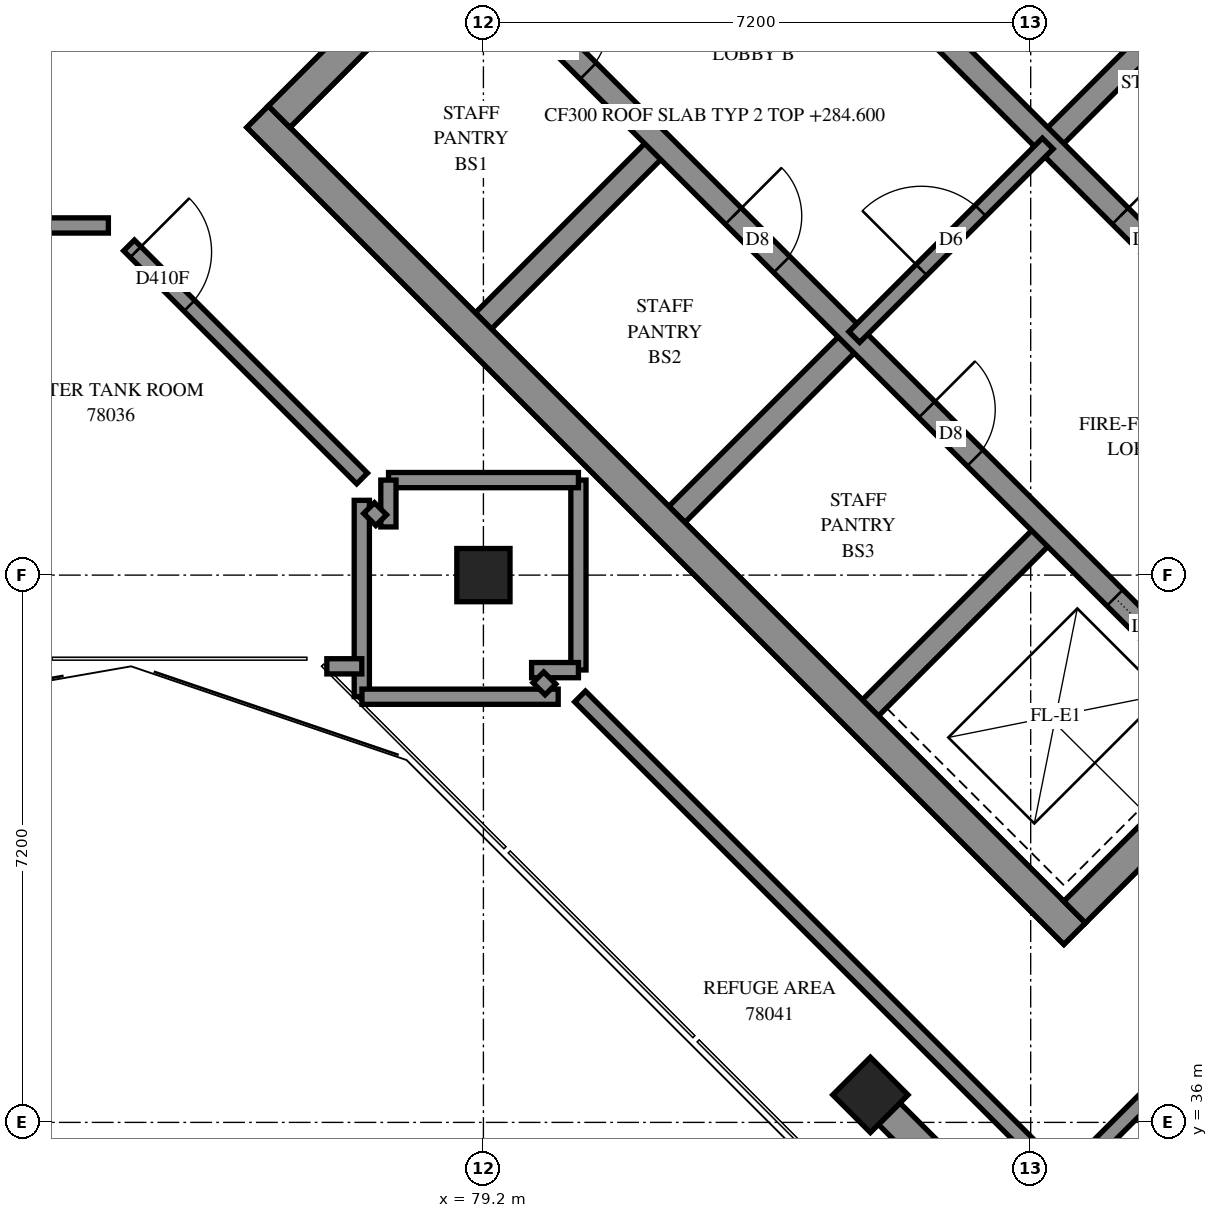
"""IFC4 building model, lengths in metres.
Left out: names, types, materials, properties, quantities, classifications, styles, units other than length and angle.
Written with IfcOpenShell. Run it as: python <this file> out.ifc"""

import sys

from ifc_helpers import new_model, si_unit, direction, frame, frame_2d, origin, origin_2d, place, context, subcontext, project, spatial, rectangle, extrude, element, fill, save


model = new_model("IFC4")
c1 = context("Model", 3, precision=1e-05, world=origin(), true_north=direction((0.0, 1.0)))
c2 = subcontext(c1, "Body", "Model", "MODEL_VIEW")
j1 = project(units=[si_unit("LENGTHUNIT", "METRE"), si_unit("PLANEANGLEUNIT", "RADIAN")], contexts=[c1])
p1 = place(None, origin())
s1 = spatial("IfcSite", under=j1, at=p1, CompositionType="ELEMENT")
p2 = place(p1, origin())
s2 = spatial("IfcBuilding", under=s1, at=p2, CompositionType="ELEMENT")
p3 = place(p2, frame((0.0, 0.0, 284.6)))
s3 = spatial("IfcBuildingStorey", under=s2, at=p3, CompositionType="ELEMENT", Elevation=284.6)
for number, where, z_axis, x_axis in (
    (1, (79.2, 43.2, 0.0), (0.0, 0.0, 1.0), (1.0, 0.0, 0.0)),
    (2, (84.291, 36.362, 0.0), (0.0, 0.0, 1.0), (0.707, -0.707, 0.0)),
):
    element("IfcColumn", number, at=place(p3, frame(where, z_axis=z_axis, x_axis=x_axis)), inside=s3, PredefinedType="COLUMN", context=c2, shape_type="SweptSolid", body=[
        extrude(rectangle(XDim=0.7, YDim=0.7, at=origin_2d()), origin(), (0.0, 0.0, 1.0), 5.7),
    ])
p4 = place(p3, frame((76.23, 49.231, -0.3), z_axis=(0.0, 0.0, 1.0), x_axis=(0.7071034917, -0.7071100706, 0.0)))
e3 = element("IfcWall", 3, at=p4, inside=s3, PredefinedType="SHEAR", context=c2, shape_type="SweptSolid", body=[
    extrude(rectangle(XDim=15.2, YDim=0.4, at=frame_2d((7.6, 0.0))), origin(), (0.0, 0.0, 1.0), 5.3),
])
p5 = place(p3, frame((86.695, 59.696, -0.3), z_axis=(0.0, 0.0, 1.0), x_axis=(0.7071100706, -0.7071034917, 0.0)))
e4 = element("IfcWall", 4, at=p5, inside=s3, PredefinedType="SHEAR", context=c2, shape_type="SweptSolid", body=[
    extrude(rectangle(XDim=15.2, YDim=0.4, at=frame_2d((7.6, 0.0))), origin(), (0.0, 0.0, 1.0), 5.3),
])
p6 = place(p5, frame((10.4, 0.0, 0.3)))
e5 = element("IfcOpeningElement", 5, at=p6, cuts=e4, PredefinedType="OPENING", context=c2, shape_type="SweptSolid", body=[
    extrude(rectangle(XDim=0.8, YDim=2.1, at=frame_2d((0.4, 1.05))), frame((0.0, 0.21, 0.0), z_axis=(0.0, -1.0, 0.0), x_axis=(1.0, 0.0, 0.0)), (0.0, 0.0, 1.0), 0.42),
])
p7 = place(p3, frame((76.513, 49.231, -0.3), z_axis=(0.0, 0.0, 1.0), x_axis=(0.7071067812, 0.7071067812, 0.0)))
e6 = element("IfcWall", 6, at=p7, inside=s3, PredefinedType="SHEAR", context=c2, shape_type="SweptSolid", body=[
    extrude(rectangle(XDim=14.4, YDim=0.4, at=frame_2d((7.2, 0.0))), origin(), (0.0, 0.0, 1.0), 5.3),
])
p8 = place(p7, frame((4.55, 0.0, 0.3)))
e7 = element("IfcOpeningElement", 7, at=p8, cuts=e6, PredefinedType="OPENING", context=c2, shape_type="SweptSolid", body=[
    extrude(rectangle(XDim=1.1, YDim=2.1, at=frame_2d((0.55, 1.05))), frame((0.0, 0.21, 0.0), z_axis=(0.0, -1.0, 0.0), x_axis=(1.0, 0.0, 0.0)), (0.0, 0.0, 1.0), 0.42),
])
p9 = place(p7, frame((11.35, 0.0, 0.3)))
e8 = element("IfcOpeningElement", 8, at=p9, cuts=e6, PredefinedType="OPENING", context=c2, shape_type="SweptSolid", body=[
    extrude(rectangle(XDim=1.1, YDim=2.1, at=frame_2d((0.55, 1.05))), frame((0.0, 0.21, 0.0), z_axis=(0.0, -1.0, 0.0), x_axis=(1.0, 0.0, 0.0)), (0.0, 0.0, 1.0), 0.42),
])
p10 = place(p3, frame((86.978, 38.766, -0.3), z_axis=(0.0, 0.0, 1.0), x_axis=(0.7071067812, 0.7071067812, 0.0)))
e9 = element("IfcWall", 9, at=p10, inside=s3, PredefinedType="SHEAR", context=c2, shape_type="SweptSolid", body=[
    extrude(rectangle(XDim=14.4, YDim=0.4, at=frame_2d((7.2, 0.0))), origin(), (0.0, 0.0, 1.0), 5.3),
])
p11 = place(p10, frame((4.55, 0.0, 0.3)))
e10 = element("IfcOpeningElement", 10, at=p11, cuts=e9, PredefinedType="OPENING", context=c2, shape_type="SweptSolid", body=[
    extrude(rectangle(XDim=1.1, YDim=2.1, at=frame_2d((0.55, 1.05))), frame((0.0, 0.21, 0.0), z_axis=(0.0, -1.0, 0.0), x_axis=(1.0, 0.0, 0.0)), (0.0, 0.0, 1.0), 0.42),
])
p12 = place(p10, frame((11.35, 0.0, 0.3)))
e11 = element("IfcOpeningElement", 11, at=p12, cuts=e9, PredefinedType="OPENING", context=c2, shape_type="SweptSolid", body=[
    extrude(rectangle(XDim=1.1, YDim=2.1, at=frame_2d((0.55, 1.05))), frame((0.0, 0.21, 0.0), z_axis=(0.0, -1.0, 0.0), x_axis=(1.0, 0.0, 0.0)), (0.0, 0.0, 1.0), 0.42),
])
p13 = place(p3, frame((79.2, 46.544, 0.0), z_axis=(0.0, 0.0, 1.0), x_axis=(0.7071219326, 0.7070916295, 0.0)))
e12 = element("IfcWall", 12, at=p13, inside=s3, PredefinedType="SOLIDWALL", context=c2, shape_type="SweptSolid", body=[
    extrude(rectangle(XDim=3.3, YDim=0.3, at=frame_2d((1.65, 0.0))), origin(), (0.0, 0.0, 1.0), 5.7),
])
p14 = place(p3, frame((81.746, 43.999, 0.0), z_axis=(0.0, 0.0, 1.0), x_axis=(0.7071067812, 0.7071067812, 0.0)))
e13 = element("IfcWall", 13, at=p14, inside=s3, PredefinedType="SOLIDWALL", context=c2, shape_type="SweptSolid", body=[
    extrude(rectangle(XDim=3.3, YDim=0.3, at=frame_2d((1.65, 0.0))), origin(), (0.0, 0.0, 1.0), 5.7),
])
p15 = place(p3, frame((86.625, 48.878, 0.0), z_axis=(0.0, 0.0, 1.0), x_axis=(0.7071067812, 0.7071067812, 0.0)))
e14 = element("IfcWall", 14, at=p15, inside=s3, PredefinedType="SOLIDWALL", context=c2, shape_type="SweptSolid", body=[
    extrude(rectangle(XDim=3.3, YDim=0.3, at=frame_2d((1.65, 0.0))), origin(), (0.0, 0.0, 1.0), 5.7),
])
p16 = place(p3, frame((84.291, 41.453, 0.0), z_axis=(0.0, 0.0, 1.0), x_axis=(0.7071067812, 0.7071067812, 0.0)))
e15 = element("IfcWall", 15, at=p16, inside=s3, PredefinedType="SOLIDWALL", context=c2, shape_type="SweptSolid", body=[
    extrude(rectangle(XDim=3.3, YDim=0.3, at=frame_2d((1.65, 0.0))), origin(), (0.0, 0.0, 1.0), 5.7),
])
p17 = place(p3, frame((78.988, 51.423, 0.0), z_axis=(0.0, 0.0, 1.0), x_axis=(0.7071067812, -0.7071067812, 0.0)))
e16 = element("IfcWall", 16, at=p17, inside=s3, PredefinedType="SOLIDWALL", context=c2, shape_type="SweptSolid", body=[
    extrude(rectangle(XDim=14.4, YDim=0.3, at=frame_2d((7.2, 0.0))), origin(), (0.0, 0.0, 1.0), 5.7),
])
p18 = place(p17, frame((1.35, 0.0, 0.0)))
e17 = element("IfcOpeningElement", 17, at=p18, cuts=e16, PredefinedType="OPENING", context=c2, shape_type="SweptSolid", body=[
    extrude(rectangle(XDim=0.9, YDim=2.1, at=frame_2d((0.45, 1.05))), frame((0.0, 0.16, 0.0), z_axis=(0.0, -1.0, 0.0), x_axis=(1.0, 0.0, 0.0)), (0.0, 0.0, 1.0), 0.32),
])
p19 = place(p17, frame((4.95, 0.0, 0.0)))
e18 = element("IfcOpeningElement", 18, at=p19, cuts=e16, PredefinedType="OPENING", context=c2, shape_type="SweptSolid", body=[
    extrude(rectangle(XDim=0.9, YDim=2.1, at=frame_2d((0.45, 1.05))), frame((0.0, 0.16, 0.0), z_axis=(0.0, -1.0, 0.0), x_axis=(1.0, 0.0, 0.0)), (0.0, 0.0, 1.0), 0.32),
])
p20 = place(p17, frame((8.55, 0.0, 0.0)))
e19 = element("IfcOpeningElement", 19, at=p20, cuts=e16, PredefinedType="OPENING", context=c2, shape_type="SweptSolid", body=[
    extrude(rectangle(XDim=0.9, YDim=2.1, at=frame_2d((0.45, 1.05))), frame((0.0, 0.16, 0.0), z_axis=(0.0, -1.0, 0.0), x_axis=(1.0, 0.0, 0.0)), (0.0, 0.0, 1.0), 0.32),
])
p21 = place(p17, frame((12.05, 0.0, 0.0)))
e20 = element("IfcOpeningElement", 20, at=p21, cuts=e16, PredefinedType="OPENING", context=c2, shape_type="SweptSolid", body=[
    extrude(rectangle(XDim=1.1, YDim=2.1, at=frame_2d((0.55, 1.05))), frame((0.0, 0.16, 0.0), z_axis=(0.0, -1.0, 0.0), x_axis=(1.0, 0.0, 0.0)), (0.0, 0.0, 1.0), 0.32),
])
p22 = place(p3, frame((81.534, 53.969, 0.0), z_axis=(0.0, 0.0, 1.0), x_axis=(0.707103309, -0.7071102534, 0.0)))
e21 = element("IfcWall", 21, at=p22, inside=s3, PredefinedType="SOLIDWALL", context=c2, shape_type="SweptSolid", body=[
    extrude(rectangle(XDim=14.4, YDim=0.3, at=frame_2d((7.2, 0.0))), origin(), (0.0, 0.0, 1.0), 5.7),
])
p23 = place(p22, frame((8.55, 0.0, 0.0)))
e22 = element("IfcOpeningElement", 22, at=p23, cuts=e21, PredefinedType="OPENING", context=c2, shape_type="SweptSolid", body=[
    extrude(rectangle(XDim=0.9, YDim=2.1, at=frame_2d((0.45, 1.05))), frame((0.0, 0.16, 0.0), z_axis=(0.0, -1.0, 0.0), x_axis=(1.0, 0.0, 0.0)), (0.0, 0.0, 1.0), 0.32),
])
p24 = place(p22, frame((12.05, 0.0, 0.0)))
e23 = element("IfcOpeningElement", 23, at=p24, cuts=e21, PredefinedType="OPENING", context=c2, shape_type="SweptSolid", body=[
    extrude(rectangle(XDim=1.1, YDim=2.1, at=frame_2d((0.55, 1.05))), frame((0.0, 0.16, 0.0), z_axis=(0.0, -1.0, 0.0), x_axis=(1.0, 0.0, 0.0)), (0.0, 0.0, 1.0), 0.32),
])
p25 = place(p3, frame((84.079, 46.332, 0.0), z_axis=(0.0, 0.0, 1.0), x_axis=(0.7071067812, 0.7071067812, 0.0)))
e24 = element("IfcWall", 24, at=p25, inside=s3, PredefinedType="PARTITIONING", context=c2, shape_type="SweptSolid", body=[
    extrude(rectangle(XDim=3.6, YDim=0.2, at=frame_2d((1.8, 0.0))), origin(), (0.0, 0.0, 1.0), 5.7),
])
p26 = place(p25, frame((1.25, 0.0, 0.0)))
e25 = element("IfcOpeningElement", 25, at=p26, cuts=e24, PredefinedType="OPENING", context=c2, shape_type="SweptSolid", body=[
    extrude(rectangle(XDim=1.1, YDim=2.1, at=frame_2d((0.55, 1.05))), frame((0.0, 0.11, 0.0), z_axis=(0.0, -1.0, 0.0), x_axis=(1.0, 0.0, 0.0)), (0.0, 0.0, 1.0), 0.22),
])
p27 = place(p3, frame((86.833, 62.947, 0.0), z_axis=(0.0, 0.0, 1.0), x_axis=(0.7071067812, -0.7071067812, 0.0)))
e26 = element("IfcWall", 26, at=p27, inside=s3, PredefinedType="PARTITIONING", context=c2, shape_type="SweptSolid", body=[
    extrude(rectangle(XDim=19.601, YDim=0.2, at=frame_2d((9.8, 0.0))), origin(), (0.0, 0.0, 1.0), 5.7),
])
p28 = place(p27, frame((6.487, 0.0, 0.0)))
e27 = element("IfcOpeningElement", 27, at=p28, cuts=e26, PredefinedType="OPENING", context=c2, shape_type="SweptSolid", body=[
    extrude(rectangle(XDim=1.0, YDim=2.1, at=frame_2d((0.5, 1.05))), frame((0.0, 0.11, 0.0), z_axis=(0.0, -1.0, 0.0), x_axis=(1.0, 0.0, 0.0)), (0.0, 0.0, 1.0), 0.22),
])
p29 = place(p27, frame((13.688, 0.0, 0.0)))
e28 = element("IfcOpeningElement", 28, at=p29, cuts=e26, PredefinedType="OPENING", context=c2, shape_type="SweptSolid", body=[
    extrude(rectangle(XDim=1.0, YDim=2.1, at=frame_2d((0.5, 1.05))), frame((0.0, 0.11, 0.0), z_axis=(0.0, -1.0, 0.0), x_axis=(1.0, 0.0, 0.0)), (0.0, 0.0, 1.0), 0.22),
])
p30 = place(p3, frame((55.0, 47.8, 0.0), z_axis=(0.0, 0.0, 1.0), x_axis=(1.0, 0.0, 0.0)))
e29 = element("IfcWall", 29, at=p30, inside=s3, PredefinedType="PARTITIONING", context=c2, shape_type="SweptSolid", body=[
    extrude(rectangle(XDim=19.266, YDim=0.2, at=frame_2d((9.633, 0.0))), origin(), (0.0, 0.0, 1.0), 5.7),
])
p31 = place(p30, frame((4.633, 0.0, 0.0)))
e30 = element("IfcOpeningElement", 30, at=p31, cuts=e29, PredefinedType="OPENING", context=c2, shape_type="SweptSolid", body=[
    extrude(rectangle(XDim=1.0, YDim=2.1, at=frame_2d((0.5, 1.05))), frame((0.0, 0.11, 0.0), z_axis=(0.0, -1.0, 0.0), x_axis=(1.0, 0.0, 0.0)), (0.0, 0.0, 1.0), 0.22),
])
p32 = place(p30, frame((6.707, 0.0, 0.0)))
e31 = element("IfcOpeningElement", 31, at=p32, cuts=e29, PredefinedType="OPENING", context=c2, shape_type="SweptSolid", body=[
    extrude(rectangle(XDim=1.0, YDim=2.1, at=frame_2d((0.5, 1.05))), frame((0.0, 0.11, 0.0), z_axis=(0.0, -1.0, 0.0), x_axis=(1.0, 0.0, 0.0)), (0.0, 0.0, 1.0), 0.22),
])
p33 = place(p30, frame((11.832, 0.0, 0.0)))
e32 = element("IfcOpeningElement", 32, at=p33, cuts=e29, PredefinedType="OPENING", context=c2, shape_type="SweptSolid", body=[
    extrude(rectangle(XDim=1.0, YDim=2.1, at=frame_2d((0.5, 1.05))), frame((0.0, 0.11, 0.0), z_axis=(0.0, -1.0, 0.0), x_axis=(1.0, 0.0, 0.0)), (0.0, 0.0, 1.0), 0.22),
])
p34 = place(p30, frame((13.908, 0.0, 0.0)))
e33 = element("IfcOpeningElement", 33, at=p34, cuts=e29, PredefinedType="OPENING", context=c2, shape_type="SweptSolid", body=[
    extrude(rectangle(XDim=1.0, YDim=2.1, at=frame_2d((0.5, 1.05))), frame((0.0, 0.11, 0.0), z_axis=(0.0, -1.0, 0.0), x_axis=(1.0, 0.0, 0.0)), (0.0, 0.0, 1.0), 0.22),
])
p35 = place(p3, frame((86.079, 33.061, 0.0), z_axis=(0.0, 0.0, 1.0), x_axis=(0.7071067812, 0.7071067812, 0.0)))
e34 = element("IfcWall", 34, at=p35, inside=s3, PredefinedType="PARTITIONING", context=c2, shape_type="SweptSolid", body=[
    extrude(rectangle(XDim=10.771, YDim=0.2, at=frame_2d((5.385, 0.0))), origin(), (0.0, 0.0, 1.0), 5.7),
])
p36 = place(p3, frame((80.472, 41.603, 0.0), z_axis=(0.0, 0.0, 1.0), x_axis=(0.7071067812, -0.7071067812, 0.0)))
e35 = element("IfcWall", 35, at=p36, inside=s3, PredefinedType="PARTITIONING", context=c2, shape_type="SweptSolid", body=[
    extrude(rectangle(XDim=9.006, YDim=0.2, at=frame_2d((4.503, 0.0))), origin(), (0.0, 0.0, 1.0), 5.7),
])
p37 = place(p3, frame((86.837, 35.233, 0.0), z_axis=(0.0, 0.0, 1.0), x_axis=(0.7071067812, 0.7071067812, 0.0)))
e36 = element("IfcWall", 36, at=p37, inside=s3, PredefinedType="PARTITIONING", context=c2, shape_type="SweptSolid", body=[
    extrude(rectangle(XDim=8.697, YDim=0.2, at=frame_2d((4.349, 0.0))), origin(), (0.0, 0.0, 1.0), 5.7),
])
p38 = place(p37, frame((7.45, 0.0, 0.0)))
e37 = element("IfcOpeningElement", 37, at=p38, cuts=e36, PredefinedType="OPENING", context=c2, shape_type="SweptSolid", body=[
    extrude(rectangle(XDim=1.0, YDim=2.1, at=frame_2d((0.5, 1.05))), frame((0.0, 0.11, 0.0), z_axis=(0.0, -1.0, 0.0), x_axis=(1.0, 0.0, 0.0)), (0.0, 0.0, 1.0), 0.22),
])
p39 = place(p3, frame((74.537, 47.538, 0.0), z_axis=(0.0, 0.0, 1.0), x_axis=(0.7071067812, -0.7071067812, 0.0)))
e38 = element("IfcWall", 38, at=p39, inside=s3, PredefinedType="PARTITIONING", context=c2, shape_type="SweptSolid", body=[
    extrude(rectangle(XDim=4.336, YDim=0.2, at=frame_2d((2.168, 0.0))), origin(), (0.0, 0.0, 1.0), 5.7),
])
p40 = place(p39, frame((0.122, 0.0, 0.0)))
e39 = element("IfcOpeningElement", 39, at=p40, cuts=e38, PredefinedType="OPENING", context=c2, shape_type="SweptSolid", body=[
    extrude(rectangle(XDim=1.0, YDim=2.1, at=frame_2d((0.5, 1.05))), frame((0.0, 0.11, 0.0), z_axis=(0.0, -1.0, 0.0), x_axis=(1.0, 0.0, 0.0)), (0.0, 0.0, 1.0), 0.22),
])
for number, where, z_axis, x_axis in (
    (40, (77.6, 41.602, 0.0), (0.0, 0.0, 1.0), (0.0, 1.0, 0.0)),
    (41, (77.602, 41.6, 0.0), (0.0, 0.0, 1.0), (1.0, 0.0, 0.0)),
):
    element("IfcWall", number, at=place(p3, frame(where, z_axis=z_axis, x_axis=x_axis)), inside=s3, PredefinedType="PARTITIONING", context=c2, shape_type="SweptSolid", body=[
        extrude(rectangle(XDim=2.582, YDim=0.2, at=frame_2d((1.291, 0.0))), origin(), (0.0, 0.0, 1.0), 5.7),
    ])
for number, where, z_axis, x_axis in (
    (42, (80.45, 41.952, 0.0), (0.0, 0.0, 1.0), (0.0, 1.0, 0.0)),
    (43, (77.952, 44.45, 0.0), (0.0, 0.0, 1.0), (1.0, 0.0, 0.0)),
):
    element("IfcWall", number, at=place(p3, frame(where, z_axis=z_axis, x_axis=x_axis)), inside=s3, PredefinedType="PARTITIONING", context=c2, shape_type="SweptSolid", body=[
        extrude(rectangle(XDim=2.498, YDim=0.2, at=frame_2d((1.249, 0.0))), origin(), (0.0, 0.0, 1.0), 5.7),
    ])
for number, where, z_axis, x_axis in (
    (44, (79.834, 41.95, 0.0), (0.0, 0.0, 1.0), (1.0, 0.0, 0.0)),
    (45, (77.95, 43.834, 0.0), (0.0, 0.0, 1.0), (0.0, 1.0, 0.0)),
):
    element("IfcWall", number, at=place(p3, frame(where, z_axis=z_axis, x_axis=x_axis)), inside=s3, PredefinedType="PARTITIONING", context=c2, shape_type="SweptSolid", body=[
        extrude(rectangle(XDim=0.616, YDim=0.2, at=frame_2d((0.308, 0.0))), origin(), (0.0, 0.0, 1.0), 5.7),
    ])
for number, where, z_axis, x_axis in (
    (46, (77.696, 44.082, 0.0), (0.0, 0.0, 1.0), (0.707, -0.707, 0.0)),
    (47, (79.923, 41.855, 0.0), (0.0, 0.0, 1.0), (0.707, -0.707, 0.0)),
):
    element("IfcWall", number, at=place(p3, frame(where, z_axis=z_axis, x_axis=x_axis)), inside=s3, PredefinedType="PARTITIONING", context=c2, shape_type="SweptSolid", body=[
        extrude(rectangle(XDim=0.225, YDim=0.2, at=frame_2d((0.112, 0.0))), origin(), (0.0, 0.0, 1.0), 5.7),
    ])
p41 = place(p3, frame((77.14, 42.0, 0.0), z_axis=(0.0, 0.0, 1.0), x_axis=(1.0, 0.0, 0.0)))
e48 = element("IfcWall", 48, at=p41, inside=s3, PredefinedType="PARTITIONING", context=c2, shape_type="SweptSolid", body=[
    extrude(rectangle(XDim=0.46, YDim=0.2, at=frame_2d((0.23, 0.0))), origin(), (0.0, 0.0, 1.0), 5.7),
])
p42 = place(p26, origin())
e49 = element("IfcDoor", 49, at=p42, inside=s3, OperationType="DOUBLE_DOOR_SINGLE_SWING", PredefinedType="DOOR", context=c2, shape_type="SweptSolid", body=[
    extrude(rectangle(XDim=1.1, YDim=2.1, at=frame_2d((0.55, 1.05))), frame((0.0, 0.025, 0.0), z_axis=(0.0, -1.0, 0.0), x_axis=(1.0, 0.0, 0.0)), (0.0, 0.0, 1.0), 0.05),
])
fill(e25, e49)
p43 = place(p18, origin())
e50 = element("IfcDoor", 50, at=p43, inside=s3, OperationType="SINGLE_SWING_LEFT", PredefinedType="DOOR", context=c2, shape_type="SweptSolid", body=[
    extrude(rectangle(XDim=0.9, YDim=2.1, at=frame_2d((0.45, 1.05))), frame((0.0, 0.025, 0.0), z_axis=(0.0, -1.0, 0.0), x_axis=(1.0, 0.0, 0.0)), (0.0, 0.0, 1.0), 0.05),
])
fill(e17, e50)
p44 = place(p19, origin())
e51 = element("IfcDoor", 51, at=p44, inside=s3, OperationType="SINGLE_SWING_LEFT", PredefinedType="DOOR", context=c2, shape_type="SweptSolid", body=[
    extrude(rectangle(XDim=0.9, YDim=2.1, at=frame_2d((0.45, 1.05))), frame((0.0, 0.025, 0.0), z_axis=(0.0, -1.0, 0.0), x_axis=(1.0, 0.0, 0.0)), (0.0, 0.0, 1.0), 0.05),
])
fill(e18, e51)
p45 = place(p20, origin())
e52 = element("IfcDoor", 52, at=p45, inside=s3, OperationType="SINGLE_SWING_LEFT", PredefinedType="DOOR", context=c2, shape_type="SweptSolid", body=[
    extrude(rectangle(XDim=0.9, YDim=2.1, at=frame_2d((0.45, 1.05))), frame((0.0, 0.025, 0.0), z_axis=(0.0, -1.0, 0.0), x_axis=(1.0, 0.0, 0.0)), (0.0, 0.0, 1.0), 0.05),
])
fill(e19, e52)
p46 = place(p23, origin())
e53 = element("IfcDoor", 53, at=p46, inside=s3, OperationType="SINGLE_SWING_LEFT", PredefinedType="DOOR", context=c2, shape_type="SweptSolid", body=[
    extrude(rectangle(XDim=0.9, YDim=2.1, at=frame_2d((0.45, 1.05))), frame((0.0, 0.025, 0.0), z_axis=(0.0, -1.0, 0.0), x_axis=(1.0, 0.0, 0.0)), (0.0, 0.0, 1.0), 0.05),
])
fill(e22, e53)
p47 = place(p21, origin())
e54 = element("IfcDoor", 54, at=p47, inside=s3, OperationType="SLIDING_TO_RIGHT", PredefinedType="DOOR", context=c2, shape_type="SweptSolid", body=[
    extrude(rectangle(XDim=1.1, YDim=2.1, at=frame_2d((0.55, 1.05))), frame((0.0, 0.025, 0.0), z_axis=(0.0, -1.0, 0.0), x_axis=(1.0, 0.0, 0.0)), (0.0, 0.0, 1.0), 0.05),
])
fill(e20, e54)
p48 = place(p40, origin())
e55 = element("IfcDoor", 55, at=p48, inside=s3, OperationType="SINGLE_SWING_LEFT", PredefinedType="DOOR", context=c2, shape_type="SweptSolid", body=[
    extrude(rectangle(XDim=1.0, YDim=2.1, at=frame_2d((0.5, 1.05))), frame((0.0, 0.025, 0.0), z_axis=(0.0, -1.0, 0.0), x_axis=(1.0, 0.0, 0.0)), (0.0, 0.0, 1.0), 0.05),
])
fill(e39, e55)
save(model, sys.argv[1])
